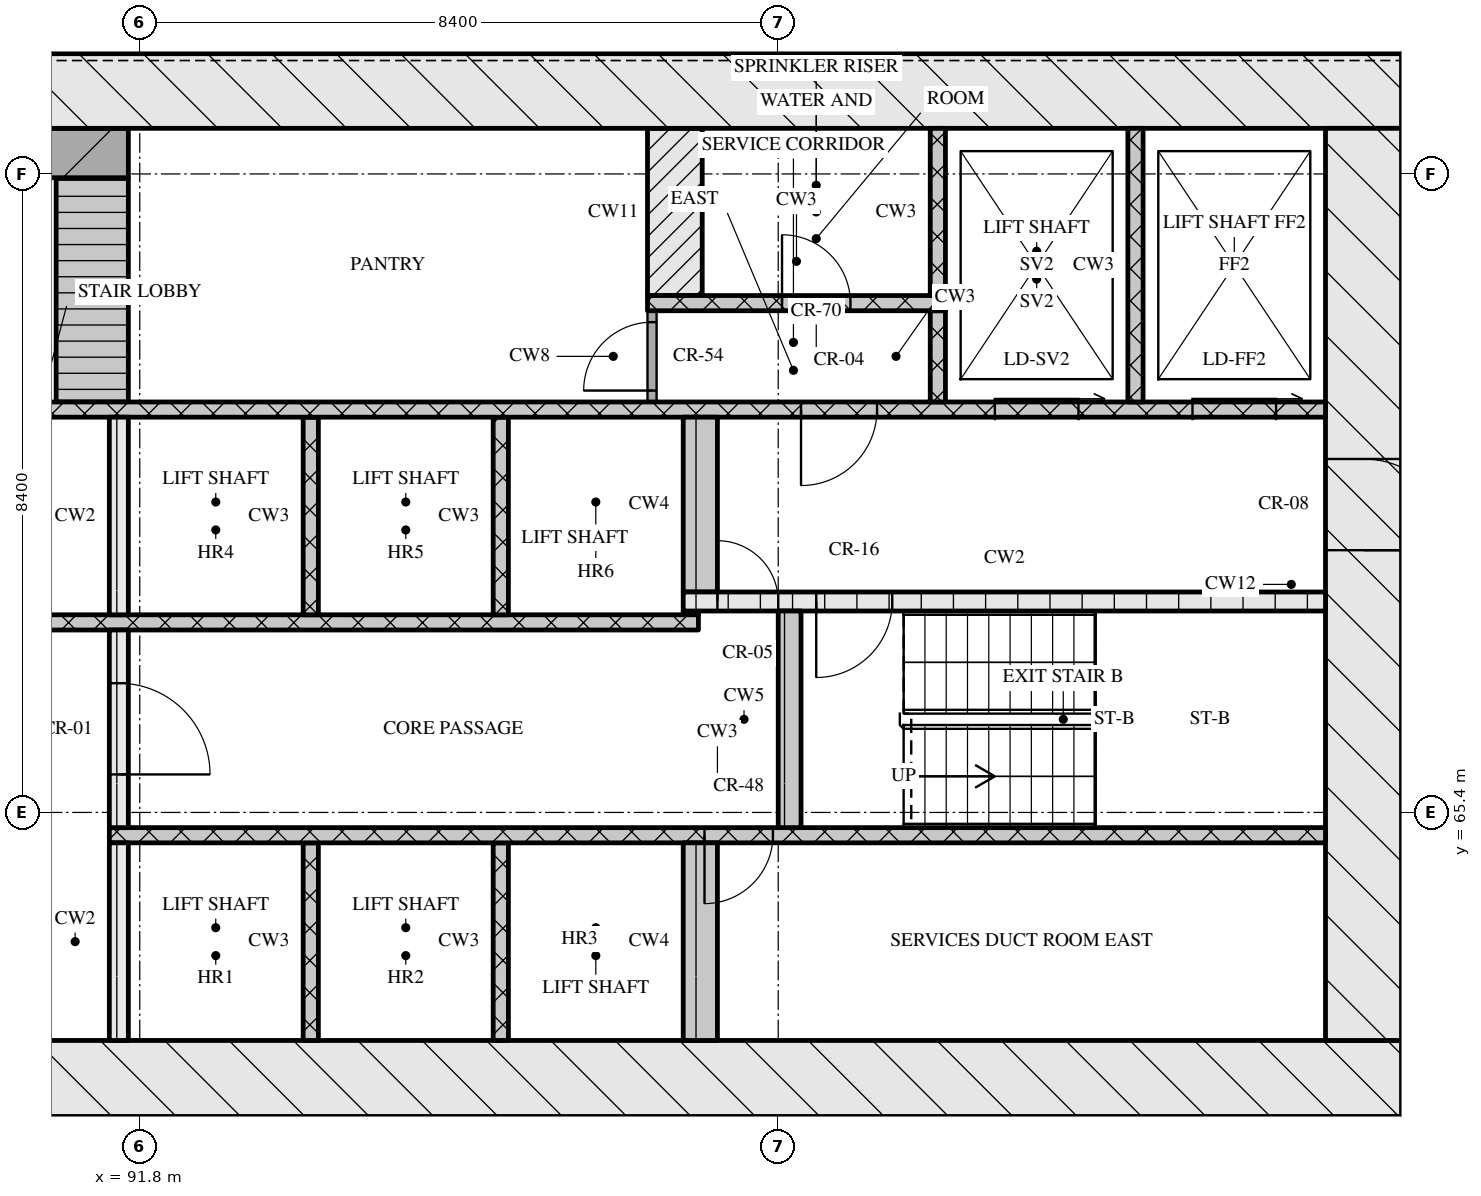
"""IFC4 building model, lengths in metres.
Left out: names, types, materials, properties, quantities, classifications, styles, units other than length and angle.
Written with IfcOpenShell. Run it as: python <this file> out.ifc"""

import sys

from ifc_helpers import new_model, si_unit, direction, frame, frame_2d, origin, place, context, subcontext, project, spatial, rectangle, extrude, element, fill, save


model = new_model("IFC4")
c1 = context("Model", 3, precision=1e-05, world=origin(), true_north=direction((0.0, 1.0)))
c2 = subcontext(c1, "Body", "Model", "MODEL_VIEW")
j1 = project(units=[si_unit("LENGTHUNIT", "METRE"), si_unit("PLANEANGLEUNIT", "RADIAN")], contexts=[c1])
p1 = place(None, origin())
s1 = spatial("IfcSite", under=j1, at=p1, CompositionType="ELEMENT")
p2 = place(p1, origin())
s2 = spatial("IfcBuilding", under=s1, at=p2, CompositionType="ELEMENT")
p3 = place(p2, frame((0.0, 0.0, 127.65)))
s3 = spatial("IfcBuildingStorey", under=s2, at=p3, CompositionType="ELEMENT", Elevation=127.65)
p4 = place(p3, frame((66.8, 61.9, 0.0), z_axis=(0.0, 0.0, 1.0), x_axis=(1.0, 0.0, 0.0)))
e1 = element("IfcWall", 1, at=p4, inside=s3, PredefinedType="SOLIDWALL", context=c2, shape_type="SweptSolid", body=[
    extrude(rectangle(XDim=41.6, YDim=1.0, at=frame_2d((20.8, 0.0))), origin(), (0.0, 0.0, 1.0), 3.32),
])
p5 = place(p4, frame((21.15, 0.0, 0.0)))
e2 = element("IfcOpeningElement", 2, at=p5, cuts=e1, PredefinedType="OPENING", context=c2, shape_type="SweptSolid", body=[
    extrude(rectangle(XDim=1.8, YDim=2.1, at=frame_2d((0.9, 1.05))), frame((0.0, 0.51, 0.0), z_axis=(0.0, -1.0, 0.0), x_axis=(1.0, 0.0, 0.0)), (0.0, 0.0, 1.0), 1.02),
])
p6 = place(p3, frame((66.8, 74.9, 0.0), z_axis=(0.0, 0.0, 1.0), x_axis=(1.0, 0.0, 0.0)))
e3 = element("IfcWall", 3, at=p6, inside=s3, PredefinedType="SOLIDWALL", context=c2, shape_type="SweptSolid", body=[
    extrude(rectangle(XDim=41.6, YDim=1.0, at=frame_2d((20.8, 0.0))), origin(), (0.0, 0.0, 1.0), 3.32),
])
p7 = place(p3, frame((107.9, 62.4, 0.0), z_axis=(0.0, 0.0, 1.0), x_axis=(0.0, 1.0, 0.0)))
e4 = element("IfcWall", 4, at=p7, inside=s3, PredefinedType="SOLIDWALL", context=c2, shape_type="SweptSolid", body=[
    extrude(rectangle(XDim=12.0, YDim=1.0, at=frame_2d((6.0, 0.0))), origin(), (0.0, 0.0, 1.0), 3.32),
])
p8 = place(p7, frame((6.45, 0.0, 0.0)))
e5 = element("IfcOpeningElement", 5, at=p8, cuts=e4, PredefinedType="OPENING", context=c2, shape_type="SweptSolid", body=[
    extrude(rectangle(XDim=1.2, YDim=2.1, at=frame_2d((0.6, 1.05))), frame((0.0, 0.51, 0.0), z_axis=(0.0, -1.0, 0.0), x_axis=(1.0, 0.0, 0.0)), (0.0, 0.0, 1.0), 1.02),
])
p9 = place(p3, frame((91.525, 62.4, 0.0), z_axis=(0.0, 0.0, 1.0), x_axis=(0.0, 1.0, 0.0)))
e6 = element("IfcWall", 6, at=p9, inside=s3, PredefinedType="SOLIDWALL", context=c2, shape_type="SweptSolid", body=[
    extrude(rectangle(XDim=2.6, YDim=0.25, at=frame_2d((1.3, 0.0))), origin(), (0.0, 0.0, 1.0), 3.32),
])
for number, where, z_axis, x_axis in (
    (7, (94.05, 62.4, 0.0), (0.0, 0.0, 1.0), (0.0, 1.0, 0.0)),
    (8, (96.55, 62.4, 0.0), (0.0, 0.0, 1.0), (0.0, 1.0, 0.0)),
):
    element("IfcWall", number, at=place(p3, frame(where, z_axis=z_axis, x_axis=x_axis)), inside=s3, PredefinedType="SOLIDWALL", context=c2, shape_type="SweptSolid", body=[
        extrude(rectangle(XDim=2.6, YDim=0.2, at=frame_2d((1.3, 0.0))), origin(), (0.0, 0.0, 1.0), 3.32),
    ])
p10 = place(p3, frame((99.175, 62.4, 0.0), z_axis=(0.0, 0.0, 1.0), x_axis=(0.0, 1.0, 0.0)))
e9 = element("IfcWall", 9, at=p10, inside=s3, PredefinedType="SOLIDWALL", context=c2, shape_type="SweptSolid", body=[
    extrude(rectangle(XDim=2.6, YDim=0.45, at=frame_2d((1.3, 0.0))), origin(), (0.0, 0.0, 1.0), 3.32),
])
p11 = place(p3, frame((91.4, 65.1, 0.0), z_axis=(0.0, 0.0, 1.0), x_axis=(1.0, 0.0, 0.0)))
e10 = element("IfcWall", 10, at=p11, inside=s3, PredefinedType="SOLIDWALL", context=c2, shape_type="SweptSolid", body=[
    extrude(rectangle(XDim=16.0, YDim=0.2, at=frame_2d((8.0, 0.0))), origin(), (0.0, 0.0, 1.0), 3.32),
])
p12 = place(p11, frame((7.83, 0.0, 0.0)))
e11 = element("IfcOpeningElement", 11, at=p12, cuts=e10, PredefinedType="OPENING", context=c2, shape_type="SweptSolid", body=[
    extrude(rectangle(XDim=0.9, YDim=2.1, at=frame_2d((0.45, 1.05))), frame((0.0, 0.11, 0.0), z_axis=(0.0, -1.0, 0.0), x_axis=(1.0, 0.0, 0.0)), (0.0, 0.0, 1.0), 0.22),
])
p13 = place(p3, frame((91.525, 65.2, 0.0), z_axis=(0.0, 0.0, 1.0), x_axis=(0.0, 1.0, 0.0)))
e12 = element("IfcWall", 12, at=p13, inside=s3, PredefinedType="SOLIDWALL", context=c2, shape_type="SweptSolid", body=[
    extrude(rectangle(XDim=2.6, YDim=0.25, at=frame_2d((1.3, 0.0))), origin(), (0.0, 0.0, 1.0), 3.32),
])
p14 = place(p13, frame((0.7, 0.0, 0.0)))
e13 = element("IfcOpeningElement", 13, at=p14, cuts=e12, PredefinedType="OPENING", context=c2, shape_type="SweptSolid", body=[
    extrude(rectangle(XDim=1.2, YDim=2.1, at=frame_2d((0.6, 1.05))), frame((0.0, 0.135, 0.0), z_axis=(0.0, -1.0, 0.0), x_axis=(1.0, 0.0, 0.0)), (0.0, 0.0, 1.0), 0.27),
])
p15 = place(p3, frame((100.35, 65.2, 0.0), z_axis=(0.0, 0.0, 1.0), x_axis=(0.0, 1.0, 0.0)))
e14 = element("IfcWall", 14, at=p15, inside=s3, PredefinedType="SOLIDWALL", context=c2, shape_type="SweptSolid", body=[
    extrude(rectangle(XDim=2.85, YDim=0.3, at=frame_2d((1.425, 0.0))), origin(), (0.0, 0.0, 1.0), 3.32),
])
p16 = place(p3, frame((76.05, 67.9, 0.0), z_axis=(0.0, 0.0, 1.0), x_axis=(1.0, 0.0, 0.0)))
e15 = element("IfcWall", 15, at=p16, inside=s3, PredefinedType="SOLIDWALL", context=c2, shape_type="SweptSolid", body=[
    extrude(rectangle(XDim=23.1, YDim=0.2, at=frame_2d((11.55, 0.0))), origin(), (0.0, 0.0, 1.0), 3.32),
])
p17 = place(p16, frame((0.6, 0.0, 0.0)))
e16 = element("IfcOpeningElement", 16, at=p17, cuts=e15, PredefinedType="OPENING", context=c2, shape_type="SweptSolid", body=[
    extrude(rectangle(XDim=1.1, YDim=2.1, at=frame_2d((0.55, 1.05))), frame((0.0, 0.11, 0.0), z_axis=(0.0, -1.0, 0.0), x_axis=(1.0, 0.0, 0.0)), (0.0, 0.0, 1.0), 0.22),
])
p18 = place(p16, frame((3.1, 0.0, 0.0)))
e17 = element("IfcOpeningElement", 17, at=p18, cuts=e15, PredefinedType="OPENING", context=c2, shape_type="SweptSolid", body=[
    extrude(rectangle(XDim=1.1, YDim=2.1, at=frame_2d((0.55, 1.05))), frame((0.0, 0.11, 0.0), z_axis=(0.0, -1.0, 0.0), x_axis=(1.0, 0.0, 0.0)), (0.0, 0.0, 1.0), 0.22),
])
p19 = place(p16, frame((5.6, 0.0, 0.0)))
e18 = element("IfcOpeningElement", 18, at=p19, cuts=e15, PredefinedType="OPENING", context=c2, shape_type="SweptSolid", body=[
    extrude(rectangle(XDim=1.1, YDim=2.1, at=frame_2d((0.55, 1.05))), frame((0.0, 0.11, 0.0), z_axis=(0.0, -1.0, 0.0), x_axis=(1.0, 0.0, 0.0)), (0.0, 0.0, 1.0), 0.22),
])
p20 = place(p16, frame((8.45, 0.0, 0.0)))
e19 = element("IfcOpeningElement", 19, at=p20, cuts=e15, PredefinedType="OPENING", context=c2, shape_type="SweptSolid", body=[
    extrude(rectangle(XDim=0.9, YDim=2.1, at=frame_2d((0.45, 1.05))), frame((0.0, 0.11, 0.0), z_axis=(0.0, -1.0, 0.0), x_axis=(1.0, 0.0, 0.0)), (0.0, 0.0, 1.0), 0.22),
])
p21 = place(p16, frame((10.91, 0.0, 0.0)))
e20 = element("IfcOpeningElement", 20, at=p21, cuts=e15, PredefinedType="OPENING", context=c2, shape_type="SweptSolid", body=[
    extrude(rectangle(XDim=0.9, YDim=2.1, at=frame_2d((0.45, 1.05))), frame((0.0, 0.11, 0.0), z_axis=(0.0, -1.0, 0.0), x_axis=(1.0, 0.0, 0.0)), (0.0, 0.0, 1.0), 0.22),
])
p22 = place(p16, frame((13.55, 0.0, 0.0)))
e21 = element("IfcOpeningElement", 21, at=p22, cuts=e15, PredefinedType="OPENING", context=c2, shape_type="SweptSolid", body=[
    extrude(rectangle(XDim=1.0, YDim=2.1, at=frame_2d((0.5, 1.05))), frame((0.0, 0.11, 0.0), z_axis=(0.0, -1.0, 0.0), x_axis=(1.0, 0.0, 0.0)), (0.0, 0.0, 1.0), 0.22),
])
p23 = place(p3, frame((91.525, 68.0, 0.0), z_axis=(0.0, 0.0, 1.0), x_axis=(0.0, 1.0, 0.0)))
e22 = element("IfcWall", 22, at=p23, inside=s3, PredefinedType="SOLIDWALL", context=c2, shape_type="SweptSolid", body=[
    extrude(rectangle(XDim=2.6, YDim=0.25, at=frame_2d((1.3, 0.0))), origin(), (0.0, 0.0, 1.0), 3.32),
])
for number, where, z_axis, x_axis in (
    (23, (94.05, 68.0, 0.0), (0.0, 0.0, 1.0), (0.0, 1.0, 0.0)),
    (24, (96.55, 68.0, 0.0), (0.0, 0.0, 1.0), (0.0, 1.0, 0.0)),
):
    element("IfcWall", number, at=place(p3, frame(where, z_axis=z_axis, x_axis=x_axis)), inside=s3, PredefinedType="SOLIDWALL", context=c2, shape_type="SweptSolid", body=[
        extrude(rectangle(XDim=2.6, YDim=0.2, at=frame_2d((1.3, 0.0))), origin(), (0.0, 0.0, 1.0), 3.32),
    ])
p24 = place(p3, frame((98.95, 68.025, 0.0), z_axis=(0.0, 0.0, 1.0), x_axis=(1.0, 0.0, 0.0)))
e25 = element("IfcWall", 25, at=p24, inside=s3, PredefinedType="SOLIDWALL", context=c2, shape_type="SweptSolid", body=[
    extrude(rectangle(XDim=0.2, YDim=0.05, at=frame_2d((0.1, 0.0))), origin(), (0.0, 0.0, 1.0), 3.32),
])
p25 = place(p3, frame((98.95, 68.175, 0.0), z_axis=(0.0, 0.0, 1.0), x_axis=(1.0, 0.0, 0.0)))
e26 = element("IfcWall", 26, at=p25, inside=s3, PredefinedType="SOLIDWALL", context=c2, shape_type="SweptSolid", body=[
    extrude(rectangle(XDim=8.45, YDim=0.25, at=frame_2d((4.225, 0.0))), origin(), (0.0, 0.0, 1.0), 3.32),
])
p26 = place(p25, frame((0.45, 0.0, 0.0)))
e27 = element("IfcOpeningElement", 27, at=p26, cuts=e26, PredefinedType="OPENING", context=c2, shape_type="SweptSolid", body=[
    extrude(rectangle(XDim=0.8, YDim=2.1, at=frame_2d((0.4, 1.05))), frame((0.0, 0.135, 0.0), z_axis=(0.0, -1.0, 0.0), x_axis=(1.0, 0.0, 0.0)), (0.0, 0.0, 1.0), 0.27),
])
p27 = place(p25, frame((1.75, 0.0, 0.0)))
e28 = element("IfcOpeningElement", 28, at=p27, cuts=e26, PredefinedType="OPENING", context=c2, shape_type="SweptSolid", body=[
    extrude(rectangle(XDim=1.0, YDim=2.1, at=frame_2d((0.5, 1.05))), frame((0.0, 0.135, 0.0), z_axis=(0.0, -1.0, 0.0), x_axis=(1.0, 0.0, 0.0)), (0.0, 0.0, 1.0), 0.27),
])
p28 = place(p3, frame((99.175, 68.3, 0.0), z_axis=(0.0, 0.0, 1.0), x_axis=(0.0, 1.0, 0.0)))
e29 = element("IfcWall", 29, at=p28, inside=s3, PredefinedType="SOLIDWALL", context=c2, shape_type="SweptSolid", body=[
    extrude(rectangle(XDim=2.3, YDim=0.45, at=frame_2d((1.15, 0.0))), origin(), (0.0, 0.0, 1.0), 3.32),
])
p29 = place(p3, frame((67.8, 70.7, 0.0), z_axis=(0.0, 0.0, 1.0), x_axis=(1.0, 0.0, 0.0)))
e30 = element("IfcWall", 30, at=p29, inside=s3, PredefinedType="SOLIDWALL", context=c2, shape_type="SweptSolid", body=[
    extrude(rectangle(XDim=39.6, YDim=0.2, at=frame_2d((19.8, 0.0))), origin(), (0.0, 0.0, 1.0), 3.32),
])
p30 = place(p29, frame((0.65, 0.0, 0.0)))
e31 = element("IfcOpeningElement", 31, at=p30, cuts=e30, PredefinedType="OPENING", context=c2, shape_type="SweptSolid", body=[
    extrude(rectangle(XDim=1.1, YDim=2.1, at=frame_2d((0.55, 1.05))), frame((0.0, 0.11, 0.0), z_axis=(0.0, -1.0, 0.0), x_axis=(1.0, 0.0, 0.0)), (0.0, 0.0, 1.0), 0.22),
])
p31 = place(p29, frame((3.25, 0.0, 0.0)))
e32 = element("IfcOpeningElement", 32, at=p31, cuts=e30, PredefinedType="OPENING", context=c2, shape_type="SweptSolid", body=[
    extrude(rectangle(XDim=1.1, YDim=2.1, at=frame_2d((0.55, 1.05))), frame((0.0, 0.11, 0.0), z_axis=(0.0, -1.0, 0.0), x_axis=(1.0, 0.0, 0.0)), (0.0, 0.0, 1.0), 0.22),
])
p32 = place(p29, frame((5.9, 0.0, 0.0)))
e33 = element("IfcOpeningElement", 33, at=p32, cuts=e30, PredefinedType="OPENING", context=c2, shape_type="SweptSolid", body=[
    extrude(rectangle(XDim=1.0, YDim=2.1, at=frame_2d((0.5, 1.05))), frame((0.0, 0.11, 0.0), z_axis=(0.0, -1.0, 0.0), x_axis=(1.0, 0.0, 0.0)), (0.0, 0.0, 1.0), 0.22),
])
p33 = place(p29, frame((21.7, 0.0, 0.0)))
e34 = element("IfcOpeningElement", 34, at=p33, cuts=e30, PredefinedType="OPENING", context=c2, shape_type="SweptSolid", body=[
    extrude(rectangle(XDim=1.0, YDim=2.1, at=frame_2d((0.5, 1.05))), frame((0.0, 0.11, 0.0), z_axis=(0.0, -1.0, 0.0), x_axis=(1.0, 0.0, 0.0)), (0.0, 0.0, 1.0), 0.22),
])
p34 = place(p29, frame((32.7, 0.0, 0.0)))
e35 = element("IfcOpeningElement", 35, at=p34, cuts=e30, PredefinedType="OPENING", context=c2, shape_type="SweptSolid", body=[
    extrude(rectangle(XDim=1.0, YDim=2.1, at=frame_2d((0.5, 1.05))), frame((0.0, 0.11, 0.0), z_axis=(0.0, -1.0, 0.0), x_axis=(1.0, 0.0, 0.0)), (0.0, 0.0, 1.0), 0.22),
])
p35 = place(p29, frame((35.25, 0.0, 0.0)))
e36 = element("IfcOpeningElement", 36, at=p35, cuts=e30, PredefinedType="OPENING", context=c2, shape_type="SweptSolid", body=[
    extrude(rectangle(XDim=1.1, YDim=2.1, at=frame_2d((0.55, 1.05))), frame((0.0, 0.11, 0.0), z_axis=(0.0, -1.0, 0.0), x_axis=(1.0, 0.0, 0.0)), (0.0, 0.0, 1.0), 0.22),
])
p36 = place(p29, frame((37.85, 0.0, 0.0)))
e37 = element("IfcOpeningElement", 37, at=p36, cuts=e30, PredefinedType="OPENING", context=c2, shape_type="SweptSolid", body=[
    extrude(rectangle(XDim=1.1, YDim=2.1, at=frame_2d((0.55, 1.05))), frame((0.0, 0.11, 0.0), z_axis=(0.0, -1.0, 0.0), x_axis=(1.0, 0.0, 0.0)), (0.0, 0.0, 1.0), 0.22),
])
p37 = place(p3, frame((91.175, 70.8, 0.0), z_axis=(0.0, 0.0, 1.0), x_axis=(0.0, 1.0, 0.0)))
e38 = element("IfcWall", 38, at=p37, inside=s3, PredefinedType="SOLIDWALL", context=c2, shape_type="SweptSolid", body=[
    extrude(rectangle(XDim=2.95, YDim=0.95, at=frame_2d((1.475, 0.0))), origin(), (0.0, 0.0, 1.0), 3.32),
])
p38 = place(p3, frame((98.54, 70.8, 0.0), z_axis=(0.0, 0.0, 1.0), x_axis=(0.0, 1.0, 0.0)))
e39 = element("IfcWall", 39, at=p38, inside=s3, PredefinedType="PARTITIONING", context=c2, shape_type="SweptSolid", body=[
    extrude(rectangle(XDim=1.2, YDim=0.12, at=frame_2d((0.6, 0.0))), origin(), (0.0, 0.0, 1.0), 3.32),
])
p39 = place(p38, frame((0.15, 0.0, 0.0)))
e40 = element("IfcOpeningElement", 40, at=p39, cuts=e39, PredefinedType="OPENING", context=c2, shape_type="SweptSolid", body=[
    extrude(rectangle(XDim=0.9, YDim=2.1, at=frame_2d((0.45, 1.05))), frame((0.0, 0.07, 0.0), z_axis=(0.0, -1.0, 0.0), x_axis=(1.0, 0.0, 0.0)), (0.0, 0.0, 1.0), 0.14),
])
p40 = place(p3, frame((102.3, 70.8, 0.0), z_axis=(0.0, 0.0, 1.0), x_axis=(0.0, 1.0, 0.0)))
e41 = element("IfcWall", 41, at=p40, inside=s3, PredefinedType="SOLIDWALL", context=c2, shape_type="SweptSolid", body=[
    extrude(rectangle(XDim=1.2, YDim=0.2, at=frame_2d((0.6, 0.0))), origin(), (0.0, 0.0, 1.0), 3.32),
])
p41 = place(p3, frame((104.9, 70.8, 0.0), z_axis=(0.0, 0.0, 1.0), x_axis=(0.0, 1.0, 0.0)))
e42 = element("IfcWall", 42, at=p41, inside=s3, PredefinedType="SOLIDWALL", context=c2, shape_type="SweptSolid", body=[
    extrude(rectangle(XDim=3.6, YDim=0.2, at=frame_2d((1.8, 0.0))), origin(), (0.0, 0.0, 1.0), 3.32),
])
p42 = place(p3, frame((98.48, 72.1, 0.0), z_axis=(0.0, 0.0, 1.0), x_axis=(1.0, 0.0, 0.0)))
e43 = element("IfcWall", 43, at=p42, inside=s3, PredefinedType="SOLIDWALL", context=c2, shape_type="SweptSolid", body=[
    extrude(rectangle(XDim=3.92, YDim=0.2, at=frame_2d((1.96, 0.0))), origin(), (0.0, 0.0, 1.0), 3.32),
])
p43 = place(p42, frame((1.77, 0.0, 0.0)))
e44 = element("IfcOpeningElement", 44, at=p43, cuts=e43, PredefinedType="OPENING", context=c2, shape_type="SweptSolid", body=[
    extrude(rectangle(XDim=0.9, YDim=2.1, at=frame_2d((0.45, 1.05))), frame((0.0, 0.11, 0.0), z_axis=(0.0, -1.0, 0.0), x_axis=(1.0, 0.0, 0.0)), (0.0, 0.0, 1.0), 0.22),
])
p44 = place(p3, frame((98.84, 72.2, 0.0), z_axis=(0.0, 0.0, 1.0), x_axis=(0.0, 1.0, 0.0)))
e45 = element("IfcWall", 45, at=p44, inside=s3, PredefinedType="SOLIDWALL", context=c2, shape_type="SweptSolid", body=[
    extrude(rectangle(XDim=2.2, YDim=0.72, at=frame_2d((1.1, 0.0))), origin(), (0.0, 0.0, 1.0), 3.32),
])
p45 = place(p3, frame((102.3, 72.2, 0.0), z_axis=(0.0, 0.0, 1.0), x_axis=(0.0, 1.0, 0.0)))
e46 = element("IfcWall", 46, at=p45, inside=s3, PredefinedType="SOLIDWALL", context=c2, shape_type="SweptSolid", body=[
    extrude(rectangle(XDim=2.2, YDim=0.2, at=frame_2d((1.1, 0.0))), origin(), (0.0, 0.0, 1.0), 3.32),
])
p46 = place(p3, frame((83.55, 74.075, 0.0), z_axis=(0.0, 0.0, 1.0), x_axis=(1.0, 0.0, 0.0)))
e47 = element("IfcWall", 47, at=p46, inside=s3, PredefinedType="SOLIDWALL", context=c2, shape_type="SweptSolid", body=[
    extrude(rectangle(XDim=8.1, YDim=0.65, at=frame_2d((4.05, 0.0))), origin(), (0.0, 0.0, 1.0), 3.32),
])
p47 = place(p12, origin())
e48 = element("IfcDoor", 48, at=p47, inside=s3, OperationType="SINGLE_SWING_RIGHT", PredefinedType="DOOR", context=c2, shape_type="SweptSolid", body=[
    extrude(rectangle(XDim=0.9, YDim=2.1, at=frame_2d((0.45, 1.05))), frame((0.0, 0.025, 0.0), z_axis=(0.0, -1.0, 0.0), x_axis=(1.0, 0.0, 0.0)), (0.0, 0.0, 1.0), 0.05),
])
fill(e11, e48)
p48 = place(p14, origin())
e49 = element("IfcDoor", 49, at=p48, inside=s3, OperationType="SINGLE_SWING_RIGHT", PredefinedType="DOOR", context=c2, shape_type="SweptSolid", body=[
    extrude(rectangle(XDim=1.2, YDim=2.1, at=frame_2d((0.6, 1.05))), frame((0.0, 0.025, 0.0), z_axis=(0.0, -1.0, 0.0), x_axis=(1.0, 0.0, 0.0)), (0.0, 0.0, 1.0), 0.05),
])
fill(e13, e49)
p49 = place(p26, origin())
e50 = element("IfcDoor", 50, at=p49, inside=s3, OperationType="SINGLE_SWING_LEFT", PredefinedType="DOOR", context=c2, shape_type="SweptSolid", body=[
    extrude(rectangle(XDim=0.8, YDim=2.1, at=frame_2d((0.4, 1.05))), frame((0.0, 0.025, 0.0), z_axis=(0.0, -1.0, 0.0), x_axis=(1.0, 0.0, 0.0)), (0.0, 0.0, 1.0), 0.05),
])
fill(e27, e50)
p50 = place(p27, origin())
e51 = element("IfcDoor", 51, at=p50, inside=s3, OperationType="SINGLE_SWING_RIGHT", PredefinedType="DOOR", context=c2, shape_type="SweptSolid", body=[
    extrude(rectangle(XDim=1.0, YDim=2.1, at=frame_2d((0.5, 1.05))), frame((0.0, 0.025, 0.0), z_axis=(0.0, -1.0, 0.0), x_axis=(1.0, 0.0, 0.0)), (0.0, 0.0, 1.0), 0.05),
])
fill(e28, e51)
p51 = place(p8, origin())
e52 = element("IfcDoor", 52, at=p51, inside=s3, OperationType="SINGLE_SWING_RIGHT", PredefinedType="DOOR", context=c2, shape_type="SweptSolid", body=[
    extrude(rectangle(XDim=1.2, YDim=2.1, at=frame_2d((0.6, 1.05))), frame((0.0, 0.025, 0.0), z_axis=(0.0, -1.0, 0.0), x_axis=(1.0, 0.0, 0.0)), (0.0, 0.0, 1.0), 0.05),
])
fill(e5, e52)
p52 = place(p34, origin())
e53 = element("IfcDoor", 53, at=p52, inside=s3, OperationType="SINGLE_SWING_RIGHT", PredefinedType="DOOR", context=c2, shape_type="SweptSolid", body=[
    extrude(rectangle(XDim=1.0, YDim=2.1, at=frame_2d((0.5, 1.05))), frame((0.0, 0.025, 0.0), z_axis=(0.0, -1.0, 0.0), x_axis=(1.0, 0.0, 0.0)), (0.0, 0.0, 1.0), 0.05),
])
fill(e35, e53)
p53 = place(p35, origin())
e54 = element("IfcDoor", 54, at=p53, inside=s3, OperationType="SLIDING_TO_RIGHT", PredefinedType="DOOR", context=c2, shape_type="SweptSolid", body=[
    extrude(rectangle(XDim=1.1, YDim=2.1, at=frame_2d((0.55, 1.05))), frame((0.0, 0.025, 0.0), z_axis=(0.0, -1.0, 0.0), x_axis=(1.0, 0.0, 0.0)), (0.0, 0.0, 1.0), 0.05),
])
fill(e36, e54)
p54 = place(p36, origin())
e55 = element("IfcDoor", 55, at=p54, inside=s3, OperationType="SLIDING_TO_RIGHT", PredefinedType="DOOR", context=c2, shape_type="SweptSolid", body=[
    extrude(rectangle(XDim=1.1, YDim=2.1, at=frame_2d((0.55, 1.05))), frame((0.0, 0.025, 0.0), z_axis=(0.0, -1.0, 0.0), x_axis=(1.0, 0.0, 0.0)), (0.0, 0.0, 1.0), 0.05),
])
fill(e37, e55)
p55 = place(p39, origin())
e56 = element("IfcDoor", 56, at=p55, inside=s3, OperationType="SINGLE_SWING_LEFT", PredefinedType="DOOR", context=c2, shape_type="SweptSolid", body=[
    extrude(rectangle(XDim=0.9, YDim=2.1, at=frame_2d((0.45, 1.05))), frame((0.0, 0.025, 0.0), z_axis=(0.0, -1.0, 0.0), x_axis=(1.0, 0.0, 0.0)), (0.0, 0.0, 1.0), 0.05),
])
fill(e40, e56)
p56 = place(p43, origin())
e57 = element("IfcDoor", 57, at=p56, inside=s3, OperationType="SINGLE_SWING_LEFT", PredefinedType="DOOR", context=c2, shape_type="SweptSolid", body=[
    extrude(rectangle(XDim=0.9, YDim=2.1, at=frame_2d((0.45, 1.05))), frame((0.0, 0.025, 0.0), z_axis=(0.0, -1.0, 0.0), x_axis=(1.0, 0.0, 0.0)), (0.0, 0.0, 1.0), 0.05),
])
fill(e44, e57)
save(model, sys.argv[1])
